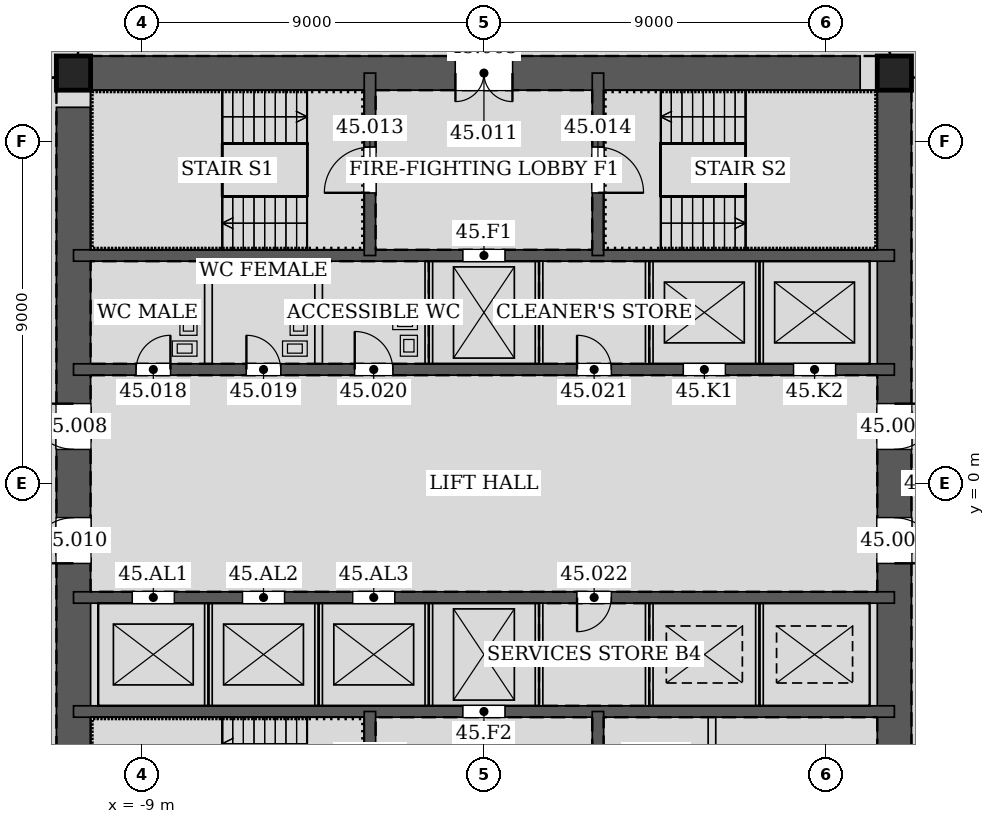
"""IFC4 building model, lengths in metres.
Left out: names, types, materials, properties, quantities, classifications, styles, units other than length and angle.
Written with IfcOpenShell. Run it as: python <this file> out.ifc"""

import sys

from ifc_helpers import new_model, si_unit, direction, frame, frame_2d, origin, origin_2d, place, context, subcontext, project, spatial, rectangle, hollow_rectangle, extrude, element, fill, save


model = new_model("IFC4")
c1 = context("Model", 3, precision=1e-05, world=origin(), true_north=direction((0.0, 1.0)))
c2 = subcontext(c1, "Body", "Model", "MODEL_VIEW")
j1 = project(units=[si_unit("LENGTHUNIT", "METRE"), si_unit("PLANEANGLEUNIT", "RADIAN")], contexts=[c1])
p1 = place(None, origin())
s1 = spatial("IfcSite", under=j1, at=p1, CompositionType="ELEMENT")
p2 = place(p1, origin())
s2 = spatial("IfcBuilding", under=s1, at=p2, CompositionType="ELEMENT")
p3 = place(p2, frame((0.0, 0.0, 198.0)))
s3 = spatial("IfcBuildingStorey", under=s2, at=p3, CompositionType="ELEMENT", Elevation=198.0)
for number, where, z_axis, x_axis in (
    (1, (10.8, 10.8, 0.0), (0.0, 0.0, 1.0), (1.0, 0.0, 0.0)),
    (2, (-10.8, 10.8, 0.0), (0.0, 0.0, 1.0), (1.0, 0.0, 0.0)),
):
    element("IfcColumn", number, at=place(p3, frame(where, z_axis=z_axis, x_axis=x_axis)), inside=s3, PredefinedType="COLUMN", context=c2, shape_type="SweptSolid", body=[
        extrude(hollow_rectangle(XDim=0.9, YDim=0.9, WallThickness=0.05, at=origin_2d()), origin(), (0.0, 0.0, 1.0), 6.0),
    ])
p4 = place(p3, frame((10.8, -10.8, 0.0), z_axis=(0.0, 0.0, 1.0), x_axis=(0.0, 1.0, 0.0)))
e3 = element("IfcWall", 3, at=p4, inside=s3, PredefinedType="SOLIDWALL", context=c2, shape_type="SweptSolid", body=[
    extrude(rectangle(XDim=21.6, YDim=0.9, at=frame_2d((10.8, 0.0))), origin(), (0.0, 0.0, 1.0), 6.0),
])
p5 = place(p4, frame((11.7, 0.0, 0.0)))
e4 = element("IfcOpeningElement", 4, at=p5, cuts=e3, PredefinedType="OPENING", context=c2, shape_type="SweptSolid", body=[
    extrude(rectangle(XDim=1.2, YDim=2.1, at=frame_2d((0.6, 1.05))), frame((0.0, 0.46, 0.0), z_axis=(0.0, -1.0, 0.0), x_axis=(1.0, 0.0, 0.0)), (0.0, 0.0, 1.0), 0.92),
])
p6 = place(p4, frame((8.7, 0.0, 0.0)))
e5 = element("IfcOpeningElement", 5, at=p6, cuts=e3, PredefinedType="OPENING", context=c2, shape_type="SweptSolid", body=[
    extrude(rectangle(XDim=1.2, YDim=2.1, at=frame_2d((0.6, 1.05))), frame((0.0, 0.46, 0.0), z_axis=(0.0, -1.0, 0.0), x_axis=(1.0, 0.0, 0.0)), (0.0, 0.0, 1.0), 0.92),
])
p7 = place(p3, frame((10.8, 10.8, 0.0), z_axis=(0.0, 0.0, 1.0), x_axis=(-1.0, 0.0, 0.0)))
e6 = element("IfcWall", 6, at=p7, inside=s3, PredefinedType="SOLIDWALL", context=c2, shape_type="SweptSolid", body=[
    extrude(rectangle(XDim=21.6, YDim=0.9, at=frame_2d((10.8, 0.0))), origin(), (0.0, 0.0, 1.0), 6.0),
])
p8 = place(p7, frame((10.05, 0.0, 0.0)))
e7 = element("IfcOpeningElement", 7, at=p8, cuts=e6, PredefinedType="OPENING", context=c2, shape_type="SweptSolid", body=[
    extrude(rectangle(XDim=1.5, YDim=2.1, at=frame_2d((0.75, 1.05))), frame((0.0, 0.46, 0.0), z_axis=(0.0, -1.0, 0.0), x_axis=(1.0, 0.0, 0.0)), (0.0, 0.0, 1.0), 0.92),
])
p9 = place(p3, frame((-10.8, 10.8, 0.0), z_axis=(0.0, 0.0, 1.0), x_axis=(0.0, -1.0, 0.0)))
e8 = element("IfcWall", 8, at=p9, inside=s3, PredefinedType="SOLIDWALL", context=c2, shape_type="SweptSolid", body=[
    extrude(rectangle(XDim=21.6, YDim=0.9, at=frame_2d((10.8, 0.0))), origin(), (0.0, 0.0, 1.0), 6.0),
])
p10 = place(p9, frame((8.7, 0.0, 0.0)))
e9 = element("IfcOpeningElement", 9, at=p10, cuts=e8, PredefinedType="OPENING", context=c2, shape_type="SweptSolid", body=[
    extrude(rectangle(XDim=1.2, YDim=2.1, at=frame_2d((0.6, 1.05))), frame((0.0, 0.46, 0.0), z_axis=(0.0, -1.0, 0.0), x_axis=(1.0, 0.0, 0.0)), (0.0, 0.0, 1.0), 0.92),
])
p11 = place(p9, frame((11.7, 0.0, 0.0)))
e10 = element("IfcOpeningElement", 10, at=p11, cuts=e8, PredefinedType="OPENING", context=c2, shape_type="SweptSolid", body=[
    extrude(rectangle(XDim=1.2, YDim=2.1, at=frame_2d((0.6, 1.05))), frame((0.0, 0.46, 0.0), z_axis=(0.0, -1.0, 0.0), x_axis=(1.0, 0.0, 0.0)), (0.0, 0.0, 1.0), 0.92),
])
p12 = place(p3, frame((-10.8, 3.0, 0.0), z_axis=(0.0, 0.0, 1.0), x_axis=(1.0, 0.0, 0.0)))
e11 = element("IfcWall", 11, at=p12, inside=s3, PredefinedType="SOLIDWALL", context=c2, shape_type="SweptSolid", body=[
    extrude(rectangle(XDim=21.6, YDim=0.3, at=frame_2d((10.8, 0.0))), origin(), (0.0, 0.0, 1.0), 6.0),
])
p13 = place(p12, frame((1.65, 0.0, 0.0)))
e12 = element("IfcOpeningElement", 12, at=p13, cuts=e11, PredefinedType="OPENING", context=c2, shape_type="SweptSolid", body=[
    extrude(rectangle(XDim=0.9, YDim=2.1, at=frame_2d((0.45, 1.05))), frame((0.0, 0.16, 0.0), z_axis=(0.0, -1.0, 0.0), x_axis=(1.0, 0.0, 0.0)), (0.0, 0.0, 1.0), 0.32),
])
p14 = place(p12, frame((4.55, 0.0, 0.0)))
e13 = element("IfcOpeningElement", 13, at=p14, cuts=e11, PredefinedType="OPENING", context=c2, shape_type="SweptSolid", body=[
    extrude(rectangle(XDim=0.9, YDim=2.1, at=frame_2d((0.45, 1.05))), frame((0.0, 0.16, 0.0), z_axis=(0.0, -1.0, 0.0), x_axis=(1.0, 0.0, 0.0)), (0.0, 0.0, 1.0), 0.32),
])
p15 = place(p12, frame((7.4, 0.0, 0.0)))
e14 = element("IfcOpeningElement", 14, at=p15, cuts=e11, PredefinedType="OPENING", context=c2, shape_type="SweptSolid", body=[
    extrude(rectangle(XDim=1.0, YDim=2.1, at=frame_2d((0.5, 1.05))), frame((0.0, 0.16, 0.0), z_axis=(0.0, -1.0, 0.0), x_axis=(1.0, 0.0, 0.0)), (0.0, 0.0, 1.0), 0.32),
])
p16 = place(p12, frame((13.25, 0.0, 0.0)))
e15 = element("IfcOpeningElement", 15, at=p16, cuts=e11, PredefinedType="OPENING", context=c2, shape_type="SweptSolid", body=[
    extrude(rectangle(XDim=0.9, YDim=2.1, at=frame_2d((0.45, 1.05))), frame((0.0, 0.16, 0.0), z_axis=(0.0, -1.0, 0.0), x_axis=(1.0, 0.0, 0.0)), (0.0, 0.0, 1.0), 0.32),
])
p17 = place(p12, frame((16.05, 0.0, 0.0)))
e16 = element("IfcOpeningElement", 16, at=p17, cuts=e11, PredefinedType="OPENING", context=c2, shape_type="SweptSolid", body=[
    extrude(rectangle(XDim=1.1, YDim=2.1, at=frame_2d((0.55, 1.05))), frame((0.0, 0.16, 0.0), z_axis=(0.0, -1.0, 0.0), x_axis=(1.0, 0.0, 0.0)), (0.0, 0.0, 1.0), 0.32),
])
p18 = place(p12, frame((18.95, 0.0, 0.0)))
e17 = element("IfcOpeningElement", 17, at=p18, cuts=e11, PredefinedType="OPENING", context=c2, shape_type="SweptSolid", body=[
    extrude(rectangle(XDim=1.1, YDim=2.1, at=frame_2d((0.55, 1.05))), frame((0.0, 0.16, 0.0), z_axis=(0.0, -1.0, 0.0), x_axis=(1.0, 0.0, 0.0)), (0.0, 0.0, 1.0), 0.32),
])
p19 = place(p3, frame((-10.8, 6.0, 0.0), z_axis=(0.0, 0.0, 1.0), x_axis=(1.0, 0.0, 0.0)))
e18 = element("IfcWall", 18, at=p19, inside=s3, PredefinedType="SOLIDWALL", context=c2, shape_type="SweptSolid", body=[
    extrude(rectangle(XDim=21.6, YDim=0.3, at=frame_2d((10.8, 0.0))), origin(), (0.0, 0.0, 1.0), 6.0),
])
p20 = place(p19, frame((10.25, 0.0, 0.0)))
e19 = element("IfcOpeningElement", 19, at=p20, cuts=e18, PredefinedType="OPENING", context=c2, shape_type="SweptSolid", body=[
    extrude(rectangle(XDim=1.1, YDim=2.1, at=frame_2d((0.55, 1.05))), frame((0.0, 0.16, 0.0), z_axis=(0.0, -1.0, 0.0), x_axis=(1.0, 0.0, 0.0)), (0.0, 0.0, 1.0), 0.32),
])
p21 = place(p3, frame((-3.0, 6.0, 0.0), z_axis=(0.0, 0.0, 1.0), x_axis=(0.0, 1.0, 0.0)))
e20 = element("IfcWall", 20, at=p21, inside=s3, PredefinedType="SOLIDWALL", context=c2, shape_type="SweptSolid", body=[
    extrude(rectangle(XDim=4.8, YDim=0.3, at=frame_2d((2.4, 0.0))), origin(), (0.0, 0.0, 1.0), 6.0),
])
p22 = place(p21, frame((1.65, 0.0, 0.0)))
e21 = element("IfcOpeningElement", 21, at=p22, cuts=e20, PredefinedType="OPENING", context=c2, shape_type="SweptSolid", body=[
    extrude(rectangle(XDim=1.2, YDim=2.1, at=frame_2d((0.6, 1.05))), frame((0.0, 0.16, 0.0), z_axis=(0.0, -1.0, 0.0), x_axis=(1.0, 0.0, 0.0)), (0.0, 0.0, 1.0), 0.32),
])
p23 = place(p3, frame((3.0, 6.0, 0.0), z_axis=(0.0, 0.0, 1.0), x_axis=(0.0, 1.0, 0.0)))
e22 = element("IfcWall", 22, at=p23, inside=s3, PredefinedType="SOLIDWALL", context=c2, shape_type="SweptSolid", body=[
    extrude(rectangle(XDim=4.8, YDim=0.3, at=frame_2d((2.4, 0.0))), origin(), (0.0, 0.0, 1.0), 6.0),
])
p24 = place(p23, frame((1.65, 0.0, 0.0)))
e23 = element("IfcOpeningElement", 23, at=p24, cuts=e22, PredefinedType="OPENING", context=c2, shape_type="SweptSolid", body=[
    extrude(rectangle(XDim=1.2, YDim=2.1, at=frame_2d((0.6, 1.05))), frame((0.0, 0.16, 0.0), z_axis=(0.0, -1.0, 0.0), x_axis=(1.0, 0.0, 0.0)), (0.0, 0.0, 1.0), 0.32),
])
p25 = place(p3, frame((-10.8, -3.0, 0.0), z_axis=(0.0, 0.0, 1.0), x_axis=(1.0, 0.0, 0.0)))
e24 = element("IfcWall", 24, at=p25, inside=s3, PredefinedType="SOLIDWALL", context=c2, shape_type="SweptSolid", body=[
    extrude(rectangle(XDim=21.6, YDim=0.3, at=frame_2d((10.8, 0.0))), origin(), (0.0, 0.0, 1.0), 6.0),
])
p26 = place(p25, frame((13.25, 0.0, 0.0)))
e25 = element("IfcOpeningElement", 25, at=p26, cuts=e24, PredefinedType="OPENING", context=c2, shape_type="SweptSolid", body=[
    extrude(rectangle(XDim=0.9, YDim=2.1, at=frame_2d((0.45, 1.05))), frame((0.0, 0.16, 0.0), z_axis=(0.0, -1.0, 0.0), x_axis=(1.0, 0.0, 0.0)), (0.0, 0.0, 1.0), 0.32),
])
p27 = place(p25, frame((1.55, 0.0, 0.0)))
e26 = element("IfcOpeningElement", 26, at=p27, cuts=e24, PredefinedType="OPENING", context=c2, shape_type="SweptSolid", body=[
    extrude(rectangle(XDim=1.1, YDim=2.1, at=frame_2d((0.55, 1.05))), frame((0.0, 0.16, 0.0), z_axis=(0.0, -1.0, 0.0), x_axis=(1.0, 0.0, 0.0)), (0.0, 0.0, 1.0), 0.32),
])
p28 = place(p25, frame((4.45, 0.0, 0.0)))
e27 = element("IfcOpeningElement", 27, at=p28, cuts=e24, PredefinedType="OPENING", context=c2, shape_type="SweptSolid", body=[
    extrude(rectangle(XDim=1.1, YDim=2.1, at=frame_2d((0.55, 1.05))), frame((0.0, 0.16, 0.0), z_axis=(0.0, -1.0, 0.0), x_axis=(1.0, 0.0, 0.0)), (0.0, 0.0, 1.0), 0.32),
])
p29 = place(p25, frame((7.35, 0.0, 0.0)))
e28 = element("IfcOpeningElement", 28, at=p29, cuts=e24, PredefinedType="OPENING", context=c2, shape_type="SweptSolid", body=[
    extrude(rectangle(XDim=1.1, YDim=2.1, at=frame_2d((0.55, 1.05))), frame((0.0, 0.16, 0.0), z_axis=(0.0, -1.0, 0.0), x_axis=(1.0, 0.0, 0.0)), (0.0, 0.0, 1.0), 0.32),
])
p30 = place(p3, frame((-10.8, -6.0, 0.0), z_axis=(0.0, 0.0, 1.0), x_axis=(1.0, 0.0, 0.0)))
e29 = element("IfcWall", 29, at=p30, inside=s3, PredefinedType="SOLIDWALL", context=c2, shape_type="SweptSolid", body=[
    extrude(rectangle(XDim=21.6, YDim=0.3, at=frame_2d((10.8, 0.0))), origin(), (0.0, 0.0, 1.0), 6.0),
])
p31 = place(p30, frame((10.25, 0.0, 0.0)))
e30 = element("IfcOpeningElement", 30, at=p31, cuts=e29, PredefinedType="OPENING", context=c2, shape_type="SweptSolid", body=[
    extrude(rectangle(XDim=1.1, YDim=2.1, at=frame_2d((0.55, 1.05))), frame((0.0, 0.16, 0.0), z_axis=(0.0, -1.0, 0.0), x_axis=(1.0, 0.0, 0.0)), (0.0, 0.0, 1.0), 0.32),
])
p32 = place(p3, frame((-3.0, -6.0, 0.0), z_axis=(0.0, 0.0, 1.0), x_axis=(0.0, -1.0, 0.0)))
e31 = element("IfcWall", 31, at=p32, inside=s3, PredefinedType="SOLIDWALL", context=c2, shape_type="SweptSolid", body=[
    extrude(rectangle(XDim=4.8, YDim=0.3, at=frame_2d((2.4, 0.0))), origin(), (0.0, 0.0, 1.0), 6.0),
])
p33 = place(p32, frame((1.65, 0.0, 0.0)))
e32 = element("IfcOpeningElement", 32, at=p33, cuts=e31, PredefinedType="OPENING", context=c2, shape_type="SweptSolid", body=[
    extrude(rectangle(XDim=1.2, YDim=2.1, at=frame_2d((0.6, 1.05))), frame((0.0, 0.16, 0.0), z_axis=(0.0, -1.0, 0.0), x_axis=(1.0, 0.0, 0.0)), (0.0, 0.0, 1.0), 0.32),
])
p34 = place(p3, frame((3.0, -6.0, 0.0), z_axis=(0.0, 0.0, 1.0), x_axis=(0.0, -1.0, 0.0)))
e33 = element("IfcWall", 33, at=p34, inside=s3, PredefinedType="SOLIDWALL", context=c2, shape_type="SweptSolid", body=[
    extrude(rectangle(XDim=4.8, YDim=0.3, at=frame_2d((2.4, 0.0))), origin(), (0.0, 0.0, 1.0), 6.0),
])
for number, where, z_axis, x_axis in (
    (34, (-7.25, 3.15, 0.0), (0.0, 0.0, 1.0), (0.0, 1.0, 0.0)),
    (35, (-4.35, 3.15, 0.0), (0.0, 0.0, 1.0), (0.0, 1.0, 0.0)),
    (36, (-1.45, 3.15, 0.0), (0.0, 0.0, 1.0), (0.0, 1.0, 0.0)),
    (37, (1.45, 3.15, 0.0), (0.0, 0.0, 1.0), (0.0, 1.0, 0.0)),
    (38, (4.35, 3.15, 0.0), (0.0, 0.0, 1.0), (0.0, 1.0, 0.0)),
    (39, (7.25, 3.15, 0.0), (0.0, 0.0, 1.0), (0.0, 1.0, 0.0)),
):
    element("IfcWall", number, at=place(p3, frame(where, z_axis=z_axis, x_axis=x_axis)), inside=s3, PredefinedType="PARTITIONING", context=c2, shape_type="SweptSolid", body=[
        extrude(rectangle(XDim=2.7, YDim=0.2, at=frame_2d((1.35, 0.0))), origin(), (0.0, 0.0, 1.0), 5.8),
    ])
for number, where, z_axis, x_axis in (
    (40, (-7.25, -5.85, 0.0), (0.0, 0.0, 1.0), (0.0, 1.0, 0.0)),
    (41, (-4.35, -5.85, 0.0), (0.0, 0.0, 1.0), (0.0, 1.0, 0.0)),
    (42, (-1.45, -5.85, 0.0), (0.0, 0.0, 1.0), (0.0, 1.0, 0.0)),
):
    element("IfcWall", number, at=place(p3, frame(where, z_axis=z_axis, x_axis=x_axis)), inside=s3, PredefinedType="PARTITIONING", context=c2, shape_type="SweptSolid", body=[
        extrude(rectangle(XDim=2.7, YDim=0.2, at=frame_2d((1.35, 0.0))), origin(), (0.0, 0.0, 1.0), 6.0),
    ])
for number, where, z_axis, x_axis in (
    (43, (1.45, -5.85, 0.0), (0.0, 0.0, 1.0), (0.0, 1.0, 0.0)),
    (44, (4.35, -5.85, 0.0), (0.0, 0.0, 1.0), (0.0, 1.0, 0.0)),
):
    element("IfcWall", number, at=place(p3, frame(where, z_axis=z_axis, x_axis=x_axis)), inside=s3, PredefinedType="PARTITIONING", context=c2, shape_type="SweptSolid", body=[
        extrude(rectangle(XDim=2.7, YDim=0.2, at=frame_2d((1.35, 0.0))), origin(), (0.0, 0.0, 1.0), 5.8),
    ])
p35 = place(p3, frame((7.25, -5.85, 0.0), z_axis=(0.0, 0.0, 1.0), x_axis=(0.0, 1.0, 0.0)))
e45 = element("IfcWall", 45, at=p35, inside=s3, PredefinedType="PARTITIONING", context=c2, shape_type="SweptSolid", body=[
    extrude(rectangle(XDim=2.7, YDim=0.2, at=frame_2d((1.35, 0.0))), origin(), (0.0, 0.0, 1.0), 6.0),
])
p36 = place(p3, frame((6.0, -10.35, 0.0), z_axis=(0.0, 0.0, 1.0), x_axis=(0.0, 1.0, 0.0)))
e46 = element("IfcWall", 46, at=p36, inside=s3, PredefinedType="PARTITIONING", context=c2, shape_type="SweptSolid", body=[
    extrude(rectangle(XDim=4.2, YDim=0.2, at=frame_2d((2.1, 0.0))), origin(), (0.0, 0.0, 1.0), 5.8),
])
p37 = place(p36, frame((0.3, 0.0, 0.0)))
e47 = element("IfcOpeningElement", 47, at=p37, cuts=e46, PredefinedType="OPENING", context=c2, shape_type="SweptSolid", body=[
    extrude(rectangle(XDim=0.9, YDim=2.1, at=frame_2d((0.45, 1.05))), frame((0.0, 0.11, 0.0), z_axis=(0.0, -1.0, 0.0), x_axis=(1.0, 0.0, 0.0)), (0.0, 0.0, 1.0), 0.22),
])
p38 = place(p5, frame((1.2, 0.0, 0.0), z_axis=(0.0, 0.0, 1.0), x_axis=(-1.0, 0.0, 0.0)))
e48 = element("IfcDoor", 48, at=p38, inside=s3, OperationType="SINGLE_SWING_LEFT", PredefinedType="DOOR", context=c2, shape_type="SweptSolid", body=[
    extrude(rectangle(XDim=1.2, YDim=2.1, at=frame_2d((0.6, 1.05))), frame((0.0, 0.025, 0.0), z_axis=(0.0, -1.0, 0.0), x_axis=(1.0, 0.0, 0.0)), (0.0, 0.0, 1.0), 0.05),
])
fill(e4, e48)
p39 = place(p10, frame((1.2, 0.0, 0.0), z_axis=(0.0, 0.0, 1.0), x_axis=(-1.0, 0.0, 0.0)))
e49 = element("IfcDoor", 49, at=p39, inside=s3, OperationType="SINGLE_SWING_RIGHT", PredefinedType="DOOR", context=c2, shape_type="SweptSolid", body=[
    extrude(rectangle(XDim=1.2, YDim=2.1, at=frame_2d((0.6, 1.05))), frame((0.0, 0.025, 0.0), z_axis=(0.0, -1.0, 0.0), x_axis=(1.0, 0.0, 0.0)), (0.0, 0.0, 1.0), 0.05),
])
fill(e9, e49)
p40 = place(p6, frame((1.2, 0.0, 0.0), z_axis=(0.0, 0.0, 1.0), x_axis=(-1.0, 0.0, 0.0)))
e50 = element("IfcDoor", 50, at=p40, inside=s3, OperationType="SINGLE_SWING_RIGHT", PredefinedType="DOOR", context=c2, shape_type="SweptSolid", body=[
    extrude(rectangle(XDim=1.2, YDim=2.1, at=frame_2d((0.6, 1.05))), frame((0.0, 0.025, 0.0), z_axis=(0.0, -1.0, 0.0), x_axis=(1.0, 0.0, 0.0)), (0.0, 0.0, 1.0), 0.05),
])
fill(e5, e50)
p41 = place(p11, frame((1.2, 0.0, 0.0), z_axis=(0.0, 0.0, 1.0), x_axis=(-1.0, 0.0, 0.0)))
e51 = element("IfcDoor", 51, at=p41, inside=s3, OperationType="SINGLE_SWING_LEFT", PredefinedType="DOOR", context=c2, shape_type="SweptSolid", body=[
    extrude(rectangle(XDim=1.2, YDim=2.1, at=frame_2d((0.6, 1.05))), frame((0.0, 0.025, 0.0), z_axis=(0.0, -1.0, 0.0), x_axis=(1.0, 0.0, 0.0)), (0.0, 0.0, 1.0), 0.05),
])
fill(e10, e51)
p42 = place(p8, origin())
e52 = element("IfcDoor", 52, at=p42, inside=s3, OperationType="DOUBLE_DOOR_SINGLE_SWING", PredefinedType="DOOR", context=c2, shape_type="SweptSolid", body=[
    extrude(rectangle(XDim=1.5, YDim=2.1, at=frame_2d((0.75, 1.05))), frame((0.0, 0.025, 0.0), z_axis=(0.0, -1.0, 0.0), x_axis=(1.0, 0.0, 0.0)), (0.0, 0.0, 1.0), 0.05),
])
fill(e7, e52)
p43 = place(p22, origin())
e53 = element("IfcDoor", 53, at=p43, inside=s3, OperationType="SINGLE_SWING_LEFT", PredefinedType="DOOR", context=c2, shape_type="SweptSolid", body=[
    extrude(rectangle(XDim=1.2, YDim=2.1, at=frame_2d((0.6, 1.05))), frame((0.0, 0.025, 0.0), z_axis=(0.0, -1.0, 0.0), x_axis=(1.0, 0.0, 0.0)), (0.0, 0.0, 1.0), 0.05),
])
fill(e21, e53)
p44 = place(p24, frame((1.2, 0.0, 0.0), z_axis=(0.0, 0.0, 1.0), x_axis=(-1.0, 0.0, 0.0)))
e54 = element("IfcDoor", 54, at=p44, inside=s3, OperationType="SINGLE_SWING_RIGHT", PredefinedType="DOOR", context=c2, shape_type="SweptSolid", body=[
    extrude(rectangle(XDim=1.2, YDim=2.1, at=frame_2d((0.6, 1.05))), frame((0.0, 0.025, 0.0), z_axis=(0.0, -1.0, 0.0), x_axis=(1.0, 0.0, 0.0)), (0.0, 0.0, 1.0), 0.05),
])
fill(e23, e54)
p45 = place(p13, origin())
e55 = element("IfcDoor", 55, at=p45, inside=s3, OperationType="SINGLE_SWING_RIGHT", PredefinedType="DOOR", context=c2, shape_type="SweptSolid", body=[
    extrude(rectangle(XDim=0.9, YDim=2.1, at=frame_2d((0.45, 1.05))), frame((0.0, 0.025, 0.0), z_axis=(0.0, -1.0, 0.0), x_axis=(1.0, 0.0, 0.0)), (0.0, 0.0, 1.0), 0.05),
])
fill(e12, e55)
p46 = place(p14, origin())
e56 = element("IfcDoor", 56, at=p46, inside=s3, OperationType="SINGLE_SWING_LEFT", PredefinedType="DOOR", context=c2, shape_type="SweptSolid", body=[
    extrude(rectangle(XDim=0.9, YDim=2.1, at=frame_2d((0.45, 1.05))), frame((0.0, 0.025, 0.0), z_axis=(0.0, -1.0, 0.0), x_axis=(1.0, 0.0, 0.0)), (0.0, 0.0, 1.0), 0.05),
])
fill(e13, e56)
p47 = place(p15, origin())
e57 = element("IfcDoor", 57, at=p47, inside=s3, OperationType="SINGLE_SWING_LEFT", PredefinedType="DOOR", context=c2, shape_type="SweptSolid", body=[
    extrude(rectangle(XDim=1.0, YDim=2.1, at=frame_2d((0.5, 1.05))), frame((0.0, 0.025, 0.0), z_axis=(0.0, -1.0, 0.0), x_axis=(1.0, 0.0, 0.0)), (0.0, 0.0, 1.0), 0.05),
])
fill(e14, e57)
p48 = place(p16, origin())
e58 = element("IfcDoor", 58, at=p48, inside=s3, OperationType="SINGLE_SWING_LEFT", PredefinedType="DOOR", context=c2, shape_type="SweptSolid", body=[
    extrude(rectangle(XDim=0.9, YDim=2.1, at=frame_2d((0.45, 1.05))), frame((0.0, 0.025, 0.0), z_axis=(0.0, -1.0, 0.0), x_axis=(1.0, 0.0, 0.0)), (0.0, 0.0, 1.0), 0.05),
])
fill(e15, e58)
p49 = place(p26, frame((0.9, 0.0, 0.0), z_axis=(0.0, 0.0, 1.0), x_axis=(-1.0, 0.0, 0.0)))
e59 = element("IfcDoor", 59, at=p49, inside=s3, OperationType="SINGLE_SWING_RIGHT", PredefinedType="DOOR", context=c2, shape_type="SweptSolid", body=[
    extrude(rectangle(XDim=0.9, YDim=2.1, at=frame_2d((0.45, 1.05))), frame((0.0, 0.025, 0.0), z_axis=(0.0, -1.0, 0.0), x_axis=(1.0, 0.0, 0.0)), (0.0, 0.0, 1.0), 0.05),
])
fill(e25, e59)
p50 = place(p20, origin())
e60 = element("IfcDoor", 60, at=p50, inside=s3, OperationType="DOUBLE_DOOR_SLIDING", PredefinedType="DOOR", context=c2, shape_type="SweptSolid", body=[
    extrude(rectangle(XDim=1.1, YDim=2.1, at=frame_2d((0.55, 1.05))), frame((0.0, 0.025, 0.0), z_axis=(0.0, -1.0, 0.0), x_axis=(1.0, 0.0, 0.0)), (0.0, 0.0, 1.0), 0.05),
])
fill(e19, e60)
p51 = place(p17, origin())
e61 = element("IfcDoor", 61, at=p51, inside=s3, OperationType="DOUBLE_DOOR_SLIDING", PredefinedType="DOOR", context=c2, shape_type="SweptSolid", body=[
    extrude(rectangle(XDim=1.1, YDim=2.1, at=frame_2d((0.55, 1.05))), frame((0.0, 0.025, 0.0), z_axis=(0.0, -1.0, 0.0), x_axis=(1.0, 0.0, 0.0)), (0.0, 0.0, 1.0), 0.05),
])
fill(e16, e61)
p52 = place(p18, origin())
e62 = element("IfcDoor", 62, at=p52, inside=s3, OperationType="DOUBLE_DOOR_SLIDING", PredefinedType="DOOR", context=c2, shape_type="SweptSolid", body=[
    extrude(rectangle(XDim=1.1, YDim=2.1, at=frame_2d((0.55, 1.05))), frame((0.0, 0.025, 0.0), z_axis=(0.0, -1.0, 0.0), x_axis=(1.0, 0.0, 0.0)), (0.0, 0.0, 1.0), 0.05),
])
fill(e17, e62)
p53 = place(p31, origin())
e63 = element("IfcDoor", 63, at=p53, inside=s3, OperationType="DOUBLE_DOOR_SLIDING", PredefinedType="DOOR", context=c2, shape_type="SweptSolid", body=[
    extrude(rectangle(XDim=1.1, YDim=2.1, at=frame_2d((0.55, 1.05))), frame((0.0, 0.025, 0.0), z_axis=(0.0, -1.0, 0.0), x_axis=(1.0, 0.0, 0.0)), (0.0, 0.0, 1.0), 0.05),
])
fill(e30, e63)
p54 = place(p27, origin())
e64 = element("IfcDoor", 64, at=p54, inside=s3, OperationType="DOUBLE_DOOR_SLIDING", PredefinedType="DOOR", context=c2, shape_type="SweptSolid", body=[
    extrude(rectangle(XDim=1.1, YDim=2.1, at=frame_2d((0.55, 1.05))), frame((0.0, 0.025, 0.0), z_axis=(0.0, -1.0, 0.0), x_axis=(1.0, 0.0, 0.0)), (0.0, 0.0, 1.0), 0.05),
])
fill(e26, e64)
p55 = place(p28, origin())
e65 = element("IfcDoor", 65, at=p55, inside=s3, OperationType="DOUBLE_DOOR_SLIDING", PredefinedType="DOOR", context=c2, shape_type="SweptSolid", body=[
    extrude(rectangle(XDim=1.1, YDim=2.1, at=frame_2d((0.55, 1.05))), frame((0.0, 0.025, 0.0), z_axis=(0.0, -1.0, 0.0), x_axis=(1.0, 0.0, 0.0)), (0.0, 0.0, 1.0), 0.05),
])
fill(e27, e65)
p56 = place(p29, origin())
e66 = element("IfcDoor", 66, at=p56, inside=s3, OperationType="DOUBLE_DOOR_SLIDING", PredefinedType="DOOR", context=c2, shape_type="SweptSolid", body=[
    extrude(rectangle(XDim=1.1, YDim=2.1, at=frame_2d((0.55, 1.05))), frame((0.0, 0.025, 0.0), z_axis=(0.0, -1.0, 0.0), x_axis=(1.0, 0.0, 0.0)), (0.0, 0.0, 1.0), 0.05),
])
fill(e28, e66)
save(model, sys.argv[1])
